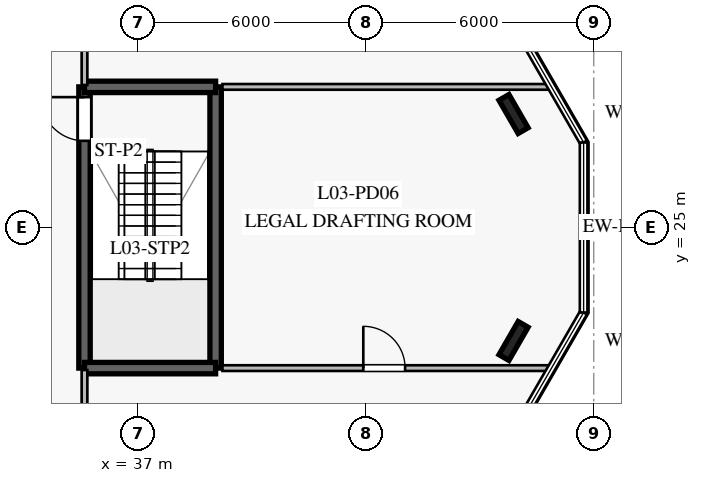
"""IFC4 building model, lengths in metres.
Left out: names, types, materials, properties, quantities, classifications, styles, units other than length and angle.
Written with IfcOpenShell. Run it as: python <this file> out.ifc"""

import sys

from ifc_helpers import new_model, si_unit, direction, frame, frame_2d, origin, origin_2d, place, context, subcontext, project, spatial, rectangle, i_section, extrude, element, fill, save


model = new_model("IFC4")
c1 = context("Model", 3, precision=1e-05, world=origin(), true_north=direction((0.0, 1.0)))
c2 = subcontext(c1, "Body", "Model", "MODEL_VIEW")
j1 = project(units=[si_unit("LENGTHUNIT", "METRE"), si_unit("PLANEANGLEUNIT", "RADIAN")], contexts=[c1])
p1 = place(None, origin())
s1 = spatial("IfcSite", under=j1, at=p1, CompositionType="ELEMENT")
p2 = place(p1, origin())
s2 = spatial("IfcBuilding", under=s1, at=p2, CompositionType="ELEMENT")
p3 = place(p2, frame((0.0, 0.0, 14.4)))
s3 = spatial("IfcBuildingStorey", under=s2, at=p3, CompositionType="ELEMENT", Elevation=14.4)
p4 = place(p3, frame((35.6, 21.3, 0.0), z_axis=(0.0, 0.0, 1.0), x_axis=(0.0, 1.0, 0.0)))
e1 = element("IfcWall", 1, at=p4, inside=s3, PredefinedType="SOLIDWALL", context=c2, shape_type="SweptSolid", body=[
    extrude(rectangle(XDim=7.4, YDim=0.3, at=frame_2d((3.7, 0.0))), origin(), (0.0, 0.0, 1.0), 4.3),
])
p5 = place(p4, frame((5.98, 0.0, 0.0)))
e2 = element("IfcOpeningElement", 2, at=p5, cuts=e1, PredefinedType="OPENING", context=c2, shape_type="SweptSolid", body=[
    extrude(rectangle(XDim=1.15, YDim=2.2, at=frame_2d((0.575, 1.1))), frame((0.0, 0.16, 0.0), z_axis=(0.0, -1.0, 0.0), x_axis=(1.0, 0.0, 0.0)), (0.0, 0.0, 1.0), 0.32),
])
p6 = place(p3, frame((39.05, 21.3, 0.0), z_axis=(0.0, 0.0, 1.0), x_axis=(0.0, 1.0, 0.0)))
e3 = element("IfcWall", 3, at=p6, inside=s3, PredefinedType="SOLIDWALL", context=c2, shape_type="SweptSolid", body=[
    extrude(rectangle(XDim=7.4, YDim=0.3, at=frame_2d((3.7, 0.0))), origin(), (0.0, 0.0, 1.0), 4.3),
])
for number, where, z_axis, x_axis in (
    (4, (35.6, 21.3, 0.0), (0.0, 0.0, 1.0), (1.0, 0.0, 0.0)),
    (5, (35.6, 28.7, 0.0), (0.0, 0.0, 1.0), (1.0, 0.0, 0.0)),
):
    element("IfcWall", number, at=place(p3, frame(where, z_axis=z_axis, x_axis=x_axis)), inside=s3, PredefinedType="SOLIDWALL", context=c2, shape_type="SweptSolid", body=[
        extrude(rectangle(XDim=3.45, YDim=0.3, at=frame_2d((1.725, 0.0))), origin(), (0.0, 0.0, 1.0), 4.3),
    ])
for number, where, z_axis, x_axis in (
    (6, (46.89, 27.986, 0.0), (0.0, 0.0, 1.0), (-0.5, 0.866, 0.0)),
    (7, (46.89, 22.014, 0.0), (0.0, 0.0, 1.0), (0.5, 0.866, 0.0)),
):
    element("IfcColumn", number, at=place(p3, frame(where, z_axis=z_axis, x_axis=x_axis)), inside=s3, PredefinedType="COLUMN", context=c2, shape_type="SweptSolid", body=[
        extrude(i_section(OverallWidth=0.302, OverallDepth=1.008, WebThickness=0.021, FlangeThickness=0.04, at=origin_2d()), origin(), (0.0, 0.0, 1.0), 4.6),
    ])
p7 = place(p3, frame((35.6, 15.0, 0.0), z_axis=(0.0, 0.0, 1.0), x_axis=(0.0, 1.0, 0.0)))
e8 = element("IfcWall", 8, at=p7, inside=s3, PredefinedType="PARTITIONING", context=c2, shape_type="SweptSolid", body=[
    extrude(rectangle(XDim=6.25, YDim=0.15, at=frame_2d((3.125, 0.0))), origin(), (0.0, 0.0, 1.0), 4.3),
])
p8 = place(p3, frame((35.6, 28.75, 0.0), z_axis=(0.0, 0.0, 1.0), x_axis=(0.0, 1.0, 0.0)))
e9 = element("IfcWall", 9, at=p8, inside=s3, PredefinedType="PARTITIONING", context=c2, shape_type="SweptSolid", body=[
    extrude(rectangle(XDim=6.25, YDim=0.15, at=frame_2d((3.125, 0.0))), origin(), (0.0, 0.0, 1.0), 3.75),
])
p9 = place(p3, frame((39.23, 21.3, 0.0), z_axis=(0.0, 0.0, 1.0), x_axis=(1.0, 0.0, 0.0)))
e10 = element("IfcWall", 10, at=p9, inside=s3, PredefinedType="PARTITIONING", context=c2, shape_type="SweptSolid", body=[
    extrude(rectangle(XDim=8.69, YDim=0.15, at=frame_2d((4.345, 0.0))), origin(), (0.0, 0.0, 1.0), 3.6),
])
p10 = place(p9, frame((3.706, 0.0, 0.0)))
e11 = element("IfcOpeningElement", 11, at=p10, cuts=e10, PredefinedType="OPENING", context=c2, shape_type="SweptSolid", body=[
    extrude(rectangle(XDim=1.1, YDim=2.2, at=frame_2d((0.55, 1.1))), frame((0.0, 0.085, 0.0), z_axis=(0.0, -1.0, 0.0), x_axis=(1.0, 0.0, 0.0)), (0.0, 0.0, 1.0), 0.17),
])
p11 = place(p3, frame((39.23, 28.7, 0.0), z_axis=(0.0, 0.0, 1.0), x_axis=(1.0, 0.0, 0.0)))
e12 = element("IfcWall", 12, at=p11, inside=s3, PredefinedType="PARTITIONING", context=c2, shape_type="SweptSolid", body=[
    extrude(rectangle(XDim=8.69, YDim=0.15, at=frame_2d((4.345, 0.0))), origin(), (0.0, 0.0, 1.0), 3.6),
])
p12 = place(p5, origin())
e13 = element("IfcDoor", 13, at=p12, inside=s3, OperationType="SINGLE_SWING_RIGHT", PredefinedType="DOOR", context=c2, shape_type="SweptSolid", body=[
    extrude(rectangle(XDim=1.15, YDim=2.2, at=frame_2d((0.575, 1.1))), frame((0.0, 0.025, 0.0), z_axis=(0.0, -1.0, 0.0), x_axis=(1.0, 0.0, 0.0)), (0.0, 0.0, 1.0), 0.05),
])
fill(e2, e13)
p13 = place(p10, origin())
e14 = element("IfcDoor", 14, at=p13, inside=s3, OperationType="SINGLE_SWING_LEFT", PredefinedType="DOOR", context=c2, shape_type="SweptSolid", body=[
    extrude(rectangle(XDim=1.1, YDim=2.2, at=frame_2d((0.55, 1.1))), frame((0.0, 0.025, 0.0), z_axis=(0.0, -1.0, 0.0), x_axis=(1.0, 0.0, 0.0)), (0.0, 0.0, 1.0), 0.05),
])
fill(e11, e14)
save(model, sys.argv[1])
